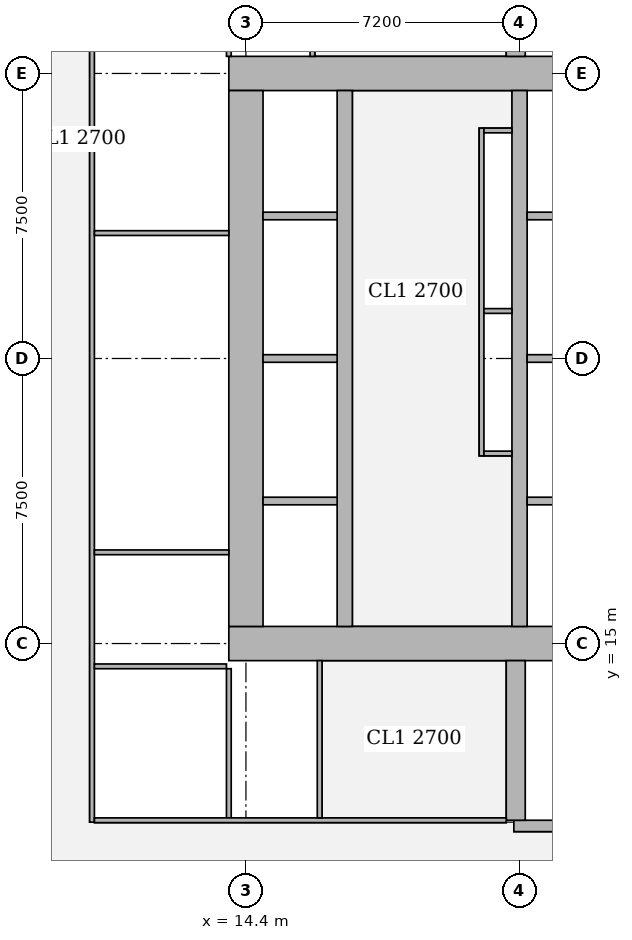
"""IFC4 building model, lengths in metres.
Left out: names, types, materials, properties, quantities, classifications, styles, units other than length and angle.
Written with IfcOpenShell. Run it as: python <this file> out.ifc"""

import sys

from ifc_helpers import new_model, si_unit, direction, frame, frame_2d, origin, place, context, subcontext, project, spatial, rectangle, extrude, element, fill, save


model = new_model("IFC4")
c1 = context("Model", 3, precision=1e-05, world=origin(), true_north=direction((0.0, 1.0)))
c2 = subcontext(c1, "Body", "Model", "MODEL_VIEW")
j1 = project(units=[si_unit("LENGTHUNIT", "METRE"), si_unit("PLANEANGLEUNIT", "RADIAN")], contexts=[c1])
p1 = place(None, origin())
s1 = spatial("IfcSite", under=j1, at=p1, CompositionType="ELEMENT")
p2 = place(p1, origin())
s2 = spatial("IfcBuilding", under=s1, at=p2, CompositionType="ELEMENT")
p3 = place(p2, frame((0.0, 0.0, 111.65)))
s3 = spatial("IfcBuildingStorey", under=s2, at=p3, CompositionType="ELEMENT", Elevation=111.65)
p4 = place(p3, frame((13.95, 15.0, 0.0), z_axis=(0.0, 0.0, 1.0), x_axis=(1.0, 0.0, 0.0)))
e1 = element("IfcWall", 1, at=p4, inside=s3, PredefinedType="SHEAR", context=c2, shape_type="SweptSolid", body=[
    extrude(rectangle(XDim=15.3, YDim=0.9, at=frame_2d((7.65, 0.0))), origin(), (0.0, 0.0, 1.0), 3.75),
])
p5 = place(p4, frame((4.45, 0.0, 0.0)))
e2 = element("IfcOpeningElement", 2, at=p5, cuts=e1, PredefinedType="OPENING", context=c2, shape_type="SweptSolid", body=[
    extrude(rectangle(XDim=1.8, YDim=2.1, at=frame_2d((0.9, 1.05))), frame((0.0, 0.46, 0.0), z_axis=(0.0, -1.0, 0.0), x_axis=(1.0, 0.0, 0.0)), (0.0, 0.0, 1.0), 0.92),
])
p6 = place(p4, frame((10.7, 0.0, 0.0)))
e3 = element("IfcOpeningElement", 3, at=p6, cuts=e1, PredefinedType="OPENING", context=c2, shape_type="SweptSolid", body=[
    extrude(rectangle(XDim=1.1, YDim=2.1, at=frame_2d((0.55, 1.05))), frame((0.0, 0.46, 0.0), z_axis=(0.0, -1.0, 0.0), x_axis=(1.0, 0.0, 0.0)), (0.0, 0.0, 1.0), 0.92),
])
p7 = place(p3, frame((13.95, 30.0, 0.0), z_axis=(0.0, 0.0, 1.0), x_axis=(1.0, 0.0, 0.0)))
e4 = element("IfcWall", 4, at=p7, inside=s3, PredefinedType="SHEAR", context=c2, shape_type="SweptSolid", body=[
    extrude(rectangle(XDim=15.3, YDim=0.9, at=frame_2d((7.65, 0.0))), origin(), (0.0, 0.0, 1.0), 3.75),
])
p8 = place(p7, frame((4.45, 0.0, 0.0)))
e5 = element("IfcOpeningElement", 5, at=p8, cuts=e4, PredefinedType="OPENING", context=c2, shape_type="SweptSolid", body=[
    extrude(rectangle(XDim=1.8, YDim=2.1, at=frame_2d((0.9, 1.05))), frame((0.0, 0.46, 0.0), z_axis=(0.0, -1.0, 0.0), x_axis=(1.0, 0.0, 0.0)), (0.0, 0.0, 1.0), 0.92),
])
p9 = place(p7, frame((10.7, 0.0, 0.0)))
e6 = element("IfcOpeningElement", 6, at=p9, cuts=e4, PredefinedType="OPENING", context=c2, shape_type="SweptSolid", body=[
    extrude(rectangle(XDim=1.1, YDim=2.1, at=frame_2d((0.55, 1.05))), frame((0.0, 0.46, 0.0), z_axis=(0.0, -1.0, 0.0), x_axis=(1.0, 0.0, 0.0)), (0.0, 0.0, 1.0), 0.92),
])
p10 = place(p3, frame((14.4, 15.45, 0.0), z_axis=(0.0, 0.0, 1.0), x_axis=(0.0, 1.0, 0.0)))
e7 = element("IfcWall", 7, at=p10, inside=s3, PredefinedType="SHEAR", context=c2, shape_type="SweptSolid", body=[
    extrude(rectangle(XDim=14.1, YDim=0.9, at=frame_2d((7.05, 0.0))), origin(), (0.0, 0.0, 1.0), 3.75),
])
p11 = place(p3, frame((17.0, 15.45, 0.0), z_axis=(0.0, 0.0, 1.0), x_axis=(0.0, 1.0, 0.0)))
e8 = element("IfcWall", 8, at=p11, inside=s3, PredefinedType="SHEAR", context=c2, shape_type="SweptSolid", body=[
    extrude(rectangle(XDim=14.1, YDim=0.4, at=frame_2d((7.05, 0.0))), origin(), (0.0, 0.0, 1.0), 3.75),
])
p12 = place(p11, frame((0.875, 0.0, 0.0)))
e9 = element("IfcOpeningElement", 9, at=p12, cuts=e8, PredefinedType="OPENING", context=c2, shape_type="SweptSolid", body=[
    extrude(rectangle(XDim=1.1, YDim=2.1, at=frame_2d((0.55, 1.05))), frame((0.0, 0.21, 0.0), z_axis=(0.0, -1.0, 0.0), x_axis=(1.0, 0.0, 0.0)), (0.0, 0.0, 1.0), 0.42),
])
p13 = place(p11, frame((4.625, 0.0, 0.0)))
e10 = element("IfcOpeningElement", 10, at=p13, cuts=e8, PredefinedType="OPENING", context=c2, shape_type="SweptSolid", body=[
    extrude(rectangle(XDim=1.1, YDim=2.1, at=frame_2d((0.55, 1.05))), frame((0.0, 0.21, 0.0), z_axis=(0.0, -1.0, 0.0), x_axis=(1.0, 0.0, 0.0)), (0.0, 0.0, 1.0), 0.42),
])
p14 = place(p11, frame((8.375, 0.0, 0.0)))
e11 = element("IfcOpeningElement", 11, at=p14, cuts=e8, PredefinedType="OPENING", context=c2, shape_type="SweptSolid", body=[
    extrude(rectangle(XDim=1.1, YDim=2.1, at=frame_2d((0.55, 1.05))), frame((0.0, 0.21, 0.0), z_axis=(0.0, -1.0, 0.0), x_axis=(1.0, 0.0, 0.0)), (0.0, 0.0, 1.0), 0.42),
])
p15 = place(p11, frame((12.125, 0.0, 0.0)))
e12 = element("IfcOpeningElement", 12, at=p15, cuts=e8, PredefinedType="OPENING", context=c2, shape_type="SweptSolid", body=[
    extrude(rectangle(XDim=1.1, YDim=2.1, at=frame_2d((0.55, 1.05))), frame((0.0, 0.21, 0.0), z_axis=(0.0, -1.0, 0.0), x_axis=(1.0, 0.0, 0.0)), (0.0, 0.0, 1.0), 0.42),
])
p16 = place(p3, frame((21.6, 15.45, 0.0), z_axis=(0.0, 0.0, 1.0), x_axis=(0.0, 1.0, 0.0)))
e13 = element("IfcWall", 13, at=p16, inside=s3, PredefinedType="SHEAR", context=c2, shape_type="SweptSolid", body=[
    extrude(rectangle(XDim=14.1, YDim=0.4, at=frame_2d((7.05, 0.0))), origin(), (0.0, 0.0, 1.0), 3.75),
])
p17 = place(p3, frame((21.45, 10.2, 0.0), z_axis=(0.0, 0.0, 1.0), x_axis=(1.0, 0.0, 0.0)))
e14 = element("IfcWall", 14, at=p17, inside=s3, PredefinedType="SHEAR", context=c2, shape_type="SweptSolid", body=[
    extrude(rectangle(XDim=7.5, YDim=0.3, at=frame_2d((3.75, 0.0))), origin(), (0.0, 0.0, 1.0), 3.75),
])
p18 = place(p17, frame((0.5, 0.0, 0.0)))
e15 = element("IfcOpeningElement", 15, at=p18, cuts=e14, PredefinedType="OPENING", context=c2, shape_type="SweptSolid", body=[
    extrude(rectangle(XDim=1.1, YDim=2.1, at=frame_2d((0.55, 1.05))), frame((0.0, 0.16, 0.0), z_axis=(0.0, -1.0, 0.0), x_axis=(1.0, 0.0, 0.0)), (0.0, 0.0, 1.0), 0.32),
])
for number, where, z_axis, x_axis in (
    (16, (21.5, 10.35, 0.0), (0.0, 0.0, 1.0), (0.0, 1.0, 0.0)),
    (17, (21.5, 30.45, 0.0), (0.0, 0.0, 1.0), (0.0, 1.0, 0.0)),
):
    element("IfcWall", number, at=place(p3, frame(where, z_axis=z_axis, x_axis=x_axis)), inside=s3, PredefinedType="SHEAR", context=c2, shape_type="SweptSolid", body=[
        extrude(rectangle(XDim=4.2, YDim=0.5, at=frame_2d((2.1, 0.0))), origin(), (0.0, 0.0, 1.0), 3.75),
    ])
p19 = place(p3, frame((10.35, 10.3, 0.0), z_axis=(0.0, 0.0, 1.0), x_axis=(0.0, 1.0, 0.0)))
e18 = element("IfcWall", 18, at=p19, inside=s3, PredefinedType="PARTITIONING", context=c2, shape_type="SweptSolid", body=[
    extrude(rectangle(XDim=24.4, YDim=0.125, at=frame_2d((12.2, 0.0))), origin(), (0.0, 0.0, 1.0), 3.5),
])
p20 = place(p19, frame((1.55, 0.0, 0.0)))
e19 = element("IfcOpeningElement", 19, at=p20, cuts=e18, PredefinedType="OPENING", context=c2, shape_type="SweptSolid", body=[
    extrude(rectangle(XDim=1.0, YDim=2.1, at=frame_2d((0.5, 1.05))), frame((0.0, 0.073, 0.0), z_axis=(0.0, -1.0, 0.0), x_axis=(1.0, 0.0, 0.0)), (0.0, 0.0, 1.0), 0.145),
])
p21 = place(p19, frame((5.1, 0.0, 0.0)))
e20 = element("IfcOpeningElement", 20, at=p21, cuts=e18, PredefinedType="OPENING", context=c2, shape_type="SweptSolid", body=[
    extrude(rectangle(XDim=1.0, YDim=2.1, at=frame_2d((0.5, 1.05))), frame((0.0, 0.073, 0.0), z_axis=(0.0, -1.0, 0.0), x_axis=(1.0, 0.0, 0.0)), (0.0, 0.0, 1.0), 0.145),
])
p22 = place(p19, frame((10.8, 0.0, 0.0)))
e21 = element("IfcOpeningElement", 21, at=p22, cuts=e18, PredefinedType="OPENING", context=c2, shape_type="SweptSolid", body=[
    extrude(rectangle(XDim=1.0, YDim=2.1, at=frame_2d((0.5, 1.05))), frame((0.0, 0.073, 0.0), z_axis=(0.0, -1.0, 0.0), x_axis=(1.0, 0.0, 0.0)), (0.0, 0.0, 1.0), 0.145),
])
p23 = place(p19, frame((18.1, 0.0, 0.0)))
e22 = element("IfcOpeningElement", 22, at=p23, cuts=e18, PredefinedType="OPENING", context=c2, shape_type="SweptSolid", body=[
    extrude(rectangle(XDim=1.0, YDim=2.1, at=frame_2d((0.5, 1.05))), frame((0.0, 0.073, 0.0), z_axis=(0.0, -1.0, 0.0), x_axis=(1.0, 0.0, 0.0)), (0.0, 0.0, 1.0), 0.145),
])
p24 = place(p19, frame((22.55, 0.0, 0.0)))
e23 = element("IfcOpeningElement", 23, at=p24, cuts=e18, PredefinedType="OPENING", context=c2, shape_type="SweptSolid", body=[
    extrude(rectangle(XDim=1.0, YDim=2.1, at=frame_2d((0.5, 1.05))), frame((0.0, 0.073, 0.0), z_axis=(0.0, -1.0, 0.0), x_axis=(1.0, 0.0, 0.0)), (0.0, 0.0, 1.0), 0.145),
])
p25 = place(p3, frame((10.413, 14.4, 0.0), z_axis=(0.0, 0.0, 1.0), x_axis=(1.0, 0.0, 0.0)))
e24 = element("IfcWall", 24, at=p25, inside=s3, PredefinedType="PARTITIONING", context=c2, shape_type="SweptSolid", body=[
    extrude(rectangle(XDim=3.475, YDim=0.125, at=frame_2d((1.737, 0.0))), origin(), (0.0, 0.0, 1.0), 3.5),
])
for number, where, z_axis, x_axis in (
    (25, (10.413, 17.4, 0.0), (0.0, 0.0, 1.0), (1.0, 0.0, 0.0)),
    (26, (10.413, 25.8, 0.0), (0.0, 0.0, 1.0), (1.0, 0.0, 0.0)),
):
    element("IfcWall", number, at=place(p3, frame(where, z_axis=z_axis, x_axis=x_axis)), inside=s3, PredefinedType="PARTITIONING", context=c2, shape_type="SweptSolid", body=[
        extrude(rectangle(XDim=3.537, YDim=0.125, at=frame_2d((1.769, 0.0))), origin(), (0.0, 0.0, 1.0), 3.5),
    ])
p26 = place(p3, frame((13.95, 10.413, 0.0), z_axis=(0.0, 0.0, 1.0), x_axis=(0.0, 1.0, 0.0)))
e27 = element("IfcWall", 27, at=p26, inside=s3, PredefinedType="PARTITIONING", context=c2, shape_type="SweptSolid", body=[
    extrude(rectangle(XDim=3.925, YDim=0.125, at=frame_2d((1.962, 0.0))), origin(), (0.0, 0.0, 1.0), 3.5),
])
p27 = place(p3, frame((13.95, 30.45, 0.0), z_axis=(0.0, 0.0, 1.0), x_axis=(0.0, 1.0, 0.0)))
e28 = element("IfcWall", 28, at=p27, inside=s3, PredefinedType="PARTITIONING", context=c2, shape_type="SweptSolid", body=[
    extrude(rectangle(XDim=4.137, YDim=0.125, at=frame_2d((2.068, 0.0))), origin(), (0.0, 0.0, 1.0), 3.5),
])
p28 = place(p3, frame((10.413, 10.35, 0.0), z_axis=(0.0, 0.0, 1.0), x_axis=(1.0, 0.0, 0.0)))
e29 = element("IfcWall", 29, at=p28, inside=s3, PredefinedType="PARTITIONING", context=c2, shape_type="SweptSolid", body=[
    extrude(rectangle(XDim=10.837, YDim=0.125, at=frame_2d((5.418, 0.0))), origin(), (0.0, 0.0, 1.0), 3.5),
])
p29 = place(p28, frame((7.582, 0.0, 0.0)))
e30 = element("IfcOpeningElement", 30, at=p29, cuts=e29, PredefinedType="OPENING", context=c2, shape_type="SweptSolid", body=[
    extrude(rectangle(XDim=1.8, YDim=2.1, at=frame_2d((0.9, 1.05))), frame((0.0, 0.073, 0.0), z_axis=(0.0, -1.0, 0.0), x_axis=(1.0, 0.0, 0.0)), (0.0, 0.0, 1.0), 0.145),
])
p30 = place(p3, frame((16.34, 10.413, 0.0), z_axis=(0.0, 0.0, 1.0), x_axis=(0.0, 1.0, 0.0)))
e31 = element("IfcWall", 31, at=p30, inside=s3, PredefinedType="PARTITIONING", context=c2, shape_type="SweptSolid", body=[
    extrude(rectangle(XDim=4.137, YDim=0.125, at=frame_2d((2.068, 0.0))), origin(), (0.0, 0.0, 1.0), 3.5),
])
p31 = place(p30, frame((1.512, 0.0, 0.0)))
e32 = element("IfcOpeningElement", 32, at=p31, cuts=e31, PredefinedType="OPENING", context=c2, shape_type="SweptSolid", body=[
    extrude(rectangle(XDim=1.0, YDim=2.1, at=frame_2d((0.5, 1.05))), frame((0.0, 0.073, 0.0), z_axis=(0.0, -1.0, 0.0), x_axis=(1.0, 0.0, 0.0)), (0.0, 0.0, 1.0), 0.145),
])
p32 = place(p3, frame((16.15, 30.45, 0.0), z_axis=(0.0, 0.0, 1.0), x_axis=(0.0, 1.0, 0.0)))
e33 = element("IfcWall", 33, at=p32, inside=s3, PredefinedType="PARTITIONING", context=c2, shape_type="SweptSolid", body=[
    extrude(rectangle(XDim=4.137, YDim=0.125, at=frame_2d((2.068, 0.0))), origin(), (0.0, 0.0, 1.0), 3.5),
])
p33 = place(p32, frame((1.625, 0.0, 0.0)))
e34 = element("IfcOpeningElement", 34, at=p33, cuts=e33, PredefinedType="OPENING", context=c2, shape_type="SweptSolid", body=[
    extrude(rectangle(XDim=1.0, YDim=2.1, at=frame_2d((0.5, 1.05))), frame((0.0, 0.073, 0.0), z_axis=(0.0, -1.0, 0.0), x_axis=(1.0, 0.0, 0.0)), (0.0, 0.0, 1.0), 0.145),
])
p34 = place(p3, frame((20.6, 19.938, 0.0), z_axis=(0.0, 0.0, 1.0), x_axis=(0.0, 1.0, 0.0)))
e35 = element("IfcWall", 35, at=p34, inside=s3, PredefinedType="PARTITIONING", context=c2, shape_type="SweptSolid", body=[
    extrude(rectangle(XDim=8.624, YDim=0.125, at=frame_2d((4.312, 0.0))), origin(), (0.0, 0.0, 1.0), 3.5),
])
p35 = place(p34, frame((1.437, 0.0, 0.0)))
e36 = element("IfcOpeningElement", 36, at=p35, cuts=e35, PredefinedType="OPENING", context=c2, shape_type="SweptSolid", body=[
    extrude(rectangle(XDim=1.0, YDim=2.1, at=frame_2d((0.5, 1.05))), frame((0.0, 0.073, 0.0), z_axis=(0.0, -1.0, 0.0), x_axis=(1.0, 0.0, 0.0)), (0.0, 0.0, 1.0), 0.145),
])
p36 = place(p34, frame((5.687, 0.0, 0.0)))
e37 = element("IfcOpeningElement", 37, at=p36, cuts=e35, PredefinedType="OPENING", context=c2, shape_type="SweptSolid", body=[
    extrude(rectangle(XDim=1.0, YDim=2.1, at=frame_2d((0.5, 1.05))), frame((0.0, 0.073, 0.0), z_axis=(0.0, -1.0, 0.0), x_axis=(1.0, 0.0, 0.0)), (0.0, 0.0, 1.0), 0.145),
])
for number, where, z_axis, x_axis in (
    (38, (20.663, 20.0, 0.0), (0.0, 0.0, 1.0), (1.0, 0.0, 0.0)),
    (39, (20.663, 28.5, 0.0), (0.0, 0.0, 1.0), (1.0, 0.0, 0.0)),
    (40, (20.663, 23.75, 0.0), (0.0, 0.0, 1.0), (1.0, 0.0, 0.0)),
):
    element("IfcWall", number, at=place(p3, frame(where, z_axis=z_axis, x_axis=x_axis)), inside=s3, PredefinedType="PARTITIONING", context=c2, shape_type="SweptSolid", body=[
        extrude(rectangle(XDim=0.737, YDim=0.125, at=frame_2d((0.368, 0.0))), origin(), (0.0, 0.0, 1.0), 3.5),
    ])
p37 = place(p3, frame((14.85, 18.75, 0.0), z_axis=(0.0, 0.0, 1.0), x_axis=(1.0, 0.0, 0.0)))
e41 = element("IfcWall", 41, at=p37, inside=s3, PredefinedType="SOLIDWALL", context=c2, shape_type="SweptSolid", body=[
    extrude(rectangle(XDim=1.95, YDim=0.2, at=frame_2d((0.975, 0.0))), origin(), (0.0, 0.0, 1.0), 3.5),
])
p38 = place(p3, frame((21.8, 18.75, 0.0), z_axis=(0.0, 0.0, 1.0), x_axis=(1.0, 0.0, 0.0)))
e42 = element("IfcWall", 42, at=p38, inside=s3, PredefinedType="SOLIDWALL", context=c2, shape_type="SweptSolid", body=[
    extrude(rectangle(XDim=2.2, YDim=0.2, at=frame_2d((1.1, 0.0))), origin(), (0.0, 0.0, 1.0), 3.5),
])
p39 = place(p3, frame((14.85, 22.5, 0.0), z_axis=(0.0, 0.0, 1.0), x_axis=(1.0, 0.0, 0.0)))
e43 = element("IfcWall", 43, at=p39, inside=s3, PredefinedType="SOLIDWALL", context=c2, shape_type="SweptSolid", body=[
    extrude(rectangle(XDim=1.95, YDim=0.2, at=frame_2d((0.975, 0.0))), origin(), (0.0, 0.0, 1.0), 3.5),
])
p40 = place(p3, frame((21.8, 22.5, 0.0), z_axis=(0.0, 0.0, 1.0), x_axis=(1.0, 0.0, 0.0)))
e44 = element("IfcWall", 44, at=p40, inside=s3, PredefinedType="SOLIDWALL", context=c2, shape_type="SweptSolid", body=[
    extrude(rectangle(XDim=2.2, YDim=0.2, at=frame_2d((1.1, 0.0))), origin(), (0.0, 0.0, 1.0), 3.5),
])
p41 = place(p3, frame((14.85, 26.25, 0.0), z_axis=(0.0, 0.0, 1.0), x_axis=(1.0, 0.0, 0.0)))
e45 = element("IfcWall", 45, at=p41, inside=s3, PredefinedType="SOLIDWALL", context=c2, shape_type="SweptSolid", body=[
    extrude(rectangle(XDim=1.95, YDim=0.2, at=frame_2d((0.975, 0.0))), origin(), (0.0, 0.0, 1.0), 3.5),
])
p42 = place(p3, frame((21.8, 26.25, 0.0), z_axis=(0.0, 0.0, 1.0), x_axis=(1.0, 0.0, 0.0)))
e46 = element("IfcWall", 46, at=p42, inside=s3, PredefinedType="SOLIDWALL", context=c2, shape_type="SweptSolid", body=[
    extrude(rectangle(XDim=2.2, YDim=0.2, at=frame_2d((1.1, 0.0))), origin(), (0.0, 0.0, 1.0), 3.5),
])
p43 = place(p20, origin())
e47 = element("IfcDoor", 47, at=p43, inside=s3, OperationType="SINGLE_SWING_RIGHT", PredefinedType="DOOR", context=c2, shape_type="SweptSolid", body=[
    extrude(rectangle(XDim=1.0, YDim=2.1, at=frame_2d((0.5, 1.05))), frame((0.0, 0.025, 0.0), z_axis=(0.0, -1.0, 0.0), x_axis=(1.0, 0.0, 0.0)), (0.0, 0.0, 1.0), 0.05),
])
fill(e19, e47)
p44 = place(p21, origin())
e48 = element("IfcDoor", 48, at=p44, inside=s3, OperationType="SINGLE_SWING_LEFT", PredefinedType="DOOR", context=c2, shape_type="SweptSolid", body=[
    extrude(rectangle(XDim=1.0, YDim=2.1, at=frame_2d((0.5, 1.05))), frame((0.0, 0.025, 0.0), z_axis=(0.0, -1.0, 0.0), x_axis=(1.0, 0.0, 0.0)), (0.0, 0.0, 1.0), 0.05),
])
fill(e20, e48)
p45 = place(p22, origin())
e49 = element("IfcDoor", 49, at=p45, inside=s3, OperationType="SINGLE_SWING_LEFT", PredefinedType="DOOR", context=c2, shape_type="SweptSolid", body=[
    extrude(rectangle(XDim=1.0, YDim=2.1, at=frame_2d((0.5, 1.05))), frame((0.0, 0.025, 0.0), z_axis=(0.0, -1.0, 0.0), x_axis=(1.0, 0.0, 0.0)), (0.0, 0.0, 1.0), 0.05),
])
fill(e21, e49)
p46 = place(p23, origin())
e50 = element("IfcDoor", 50, at=p46, inside=s3, OperationType="SINGLE_SWING_LEFT", PredefinedType="DOOR", context=c2, shape_type="SweptSolid", body=[
    extrude(rectangle(XDim=1.0, YDim=2.1, at=frame_2d((0.5, 1.05))), frame((0.0, 0.025, 0.0), z_axis=(0.0, -1.0, 0.0), x_axis=(1.0, 0.0, 0.0)), (0.0, 0.0, 1.0), 0.05),
])
fill(e22, e50)
p47 = place(p31, origin())
e51 = element("IfcDoor", 51, at=p47, inside=s3, OperationType="SINGLE_SWING_LEFT", PredefinedType="DOOR", context=c2, shape_type="SweptSolid", body=[
    extrude(rectangle(XDim=1.0, YDim=2.1, at=frame_2d((0.5, 1.05))), frame((0.0, 0.025, 0.0), z_axis=(0.0, -1.0, 0.0), x_axis=(1.0, 0.0, 0.0)), (0.0, 0.0, 1.0), 0.05),
])
fill(e32, e51)
p48 = place(p29, origin())
e52 = element("IfcDoor", 52, at=p48, inside=s3, OperationType="DOUBLE_DOOR_SINGLE_SWING", PredefinedType="DOOR", context=c2, shape_type="SweptSolid", body=[
    extrude(rectangle(XDim=1.8, YDim=2.1, at=frame_2d((0.9, 1.05))), frame((0.0, 0.025, 0.0), z_axis=(0.0, -1.0, 0.0), x_axis=(1.0, 0.0, 0.0)), (0.0, 0.0, 1.0), 0.05),
])
fill(e30, e52)
p49 = place(p35, origin())
e53 = element("IfcDoor", 53, at=p49, inside=s3, OperationType="SINGLE_SWING_LEFT", PredefinedType="DOOR", context=c2, shape_type="SweptSolid", body=[
    extrude(rectangle(XDim=1.0, YDim=2.1, at=frame_2d((0.5, 1.05))), frame((0.0, 0.025, 0.0), z_axis=(0.0, -1.0, 0.0), x_axis=(1.0, 0.0, 0.0)), (0.0, 0.0, 1.0), 0.05),
])
fill(e36, e53)
p50 = place(p36, origin())
e54 = element("IfcDoor", 54, at=p50, inside=s3, OperationType="SINGLE_SWING_RIGHT", PredefinedType="DOOR", context=c2, shape_type="SweptSolid", body=[
    extrude(rectangle(XDim=1.0, YDim=2.1, at=frame_2d((0.5, 1.05))), frame((0.0, 0.025, 0.0), z_axis=(0.0, -1.0, 0.0), x_axis=(1.0, 0.0, 0.0)), (0.0, 0.0, 1.0), 0.05),
])
fill(e37, e54)
p51 = place(p5, origin())
e55 = element("IfcDoor", 55, at=p51, inside=s3, OperationType="DOUBLE_DOOR_SINGLE_SWING", PredefinedType="DOOR", context=c2, shape_type="SweptSolid", body=[
    extrude(rectangle(XDim=1.8, YDim=2.1, at=frame_2d((0.9, 1.05))), frame((0.0, 0.025, 0.0), z_axis=(0.0, -1.0, 0.0), x_axis=(1.0, 0.0, 0.0)), (0.0, 0.0, 1.0), 0.05),
])
fill(e2, e55)
p52 = place(p8, origin())
e56 = element("IfcDoor", 56, at=p52, inside=s3, OperationType="DOUBLE_DOOR_SINGLE_SWING", PredefinedType="DOOR", context=c2, shape_type="SweptSolid", body=[
    extrude(rectangle(XDim=1.8, YDim=2.1, at=frame_2d((0.9, 1.05))), frame((0.0, 0.025, 0.0), z_axis=(0.0, -1.0, 0.0), x_axis=(1.0, 0.0, 0.0)), (0.0, 0.0, 1.0), 0.05),
])
fill(e5, e56)
p53 = place(p12, origin())
e57 = element("IfcDoor", 57, at=p53, inside=s3, OperationType="DOUBLE_DOOR_SLIDING", PredefinedType="DOOR", context=c2, shape_type="SweptSolid", body=[
    extrude(rectangle(XDim=1.1, YDim=2.1, at=frame_2d((0.55, 1.05))), frame((0.0, 0.025, 0.0), z_axis=(0.0, -1.0, 0.0), x_axis=(1.0, 0.0, 0.0)), (0.0, 0.0, 1.0), 0.05),
])
fill(e9, e57)
p54 = place(p13, origin())
e58 = element("IfcDoor", 58, at=p54, inside=s3, OperationType="DOUBLE_DOOR_SLIDING", PredefinedType="DOOR", context=c2, shape_type="SweptSolid", body=[
    extrude(rectangle(XDim=1.1, YDim=2.1, at=frame_2d((0.55, 1.05))), frame((0.0, 0.025, 0.0), z_axis=(0.0, -1.0, 0.0), x_axis=(1.0, 0.0, 0.0)), (0.0, 0.0, 1.0), 0.05),
])
fill(e10, e58)
p55 = place(p14, origin())
e59 = element("IfcDoor", 59, at=p55, inside=s3, OperationType="DOUBLE_DOOR_SLIDING", PredefinedType="DOOR", context=c2, shape_type="SweptSolid", body=[
    extrude(rectangle(XDim=1.1, YDim=2.1, at=frame_2d((0.55, 1.05))), frame((0.0, 0.025, 0.0), z_axis=(0.0, -1.0, 0.0), x_axis=(1.0, 0.0, 0.0)), (0.0, 0.0, 1.0), 0.05),
])
fill(e11, e59)
p56 = place(p15, origin())
e60 = element("IfcDoor", 60, at=p56, inside=s3, OperationType="DOUBLE_DOOR_SLIDING", PredefinedType="DOOR", context=c2, shape_type="SweptSolid", body=[
    extrude(rectangle(XDim=1.1, YDim=2.1, at=frame_2d((0.55, 1.05))), frame((0.0, 0.025, 0.0), z_axis=(0.0, -1.0, 0.0), x_axis=(1.0, 0.0, 0.0)), (0.0, 0.0, 1.0), 0.05),
])
fill(e12, e60)
p57 = place(p18, origin())
e61 = element("IfcDoor", 61, at=p57, inside=s3, OperationType="SINGLE_SWING_LEFT", PredefinedType="DOOR", context=c2, shape_type="SweptSolid", body=[
    extrude(rectangle(XDim=1.1, YDim=2.1, at=frame_2d((0.55, 1.05))), frame((0.0, 0.025, 0.0), z_axis=(0.0, -1.0, 0.0), x_axis=(1.0, 0.0, 0.0)), (0.0, 0.0, 1.0), 0.05),
])
fill(e15, e61)
save(model, sys.argv[1])
